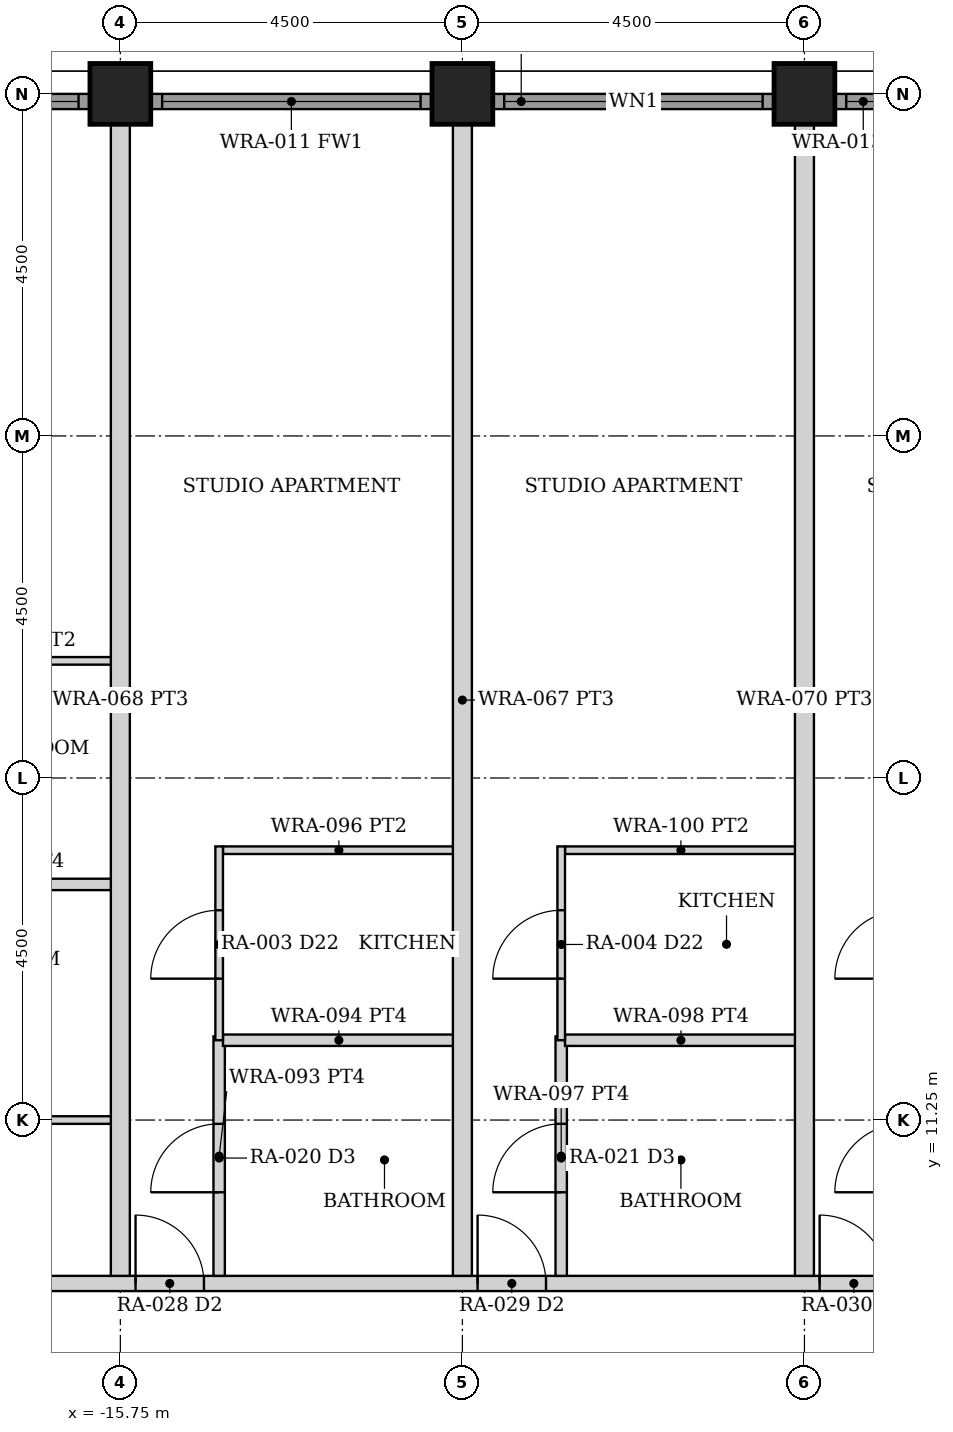
"""IFC4 building model, lengths in metres.
Left out: names, types, materials, properties, quantities, classifications, styles, units other than length and angle.
Written with IfcOpenShell. Run it as: python <this file> out.ifc"""

import sys

from ifc_helpers import new_model, si_unit, direction, frame, frame_2d, origin, origin_2d, place, context, subcontext, project, spatial, rectangle, hollow_rectangle, extrude, element, fill, save


model = new_model("IFC4")
c1 = context("Model", 3, precision=1e-05, world=origin(), true_north=direction((0.0, 1.0)))
c2 = subcontext(c1, "Body", "Model", "MODEL_VIEW")
j1 = project(units=[si_unit("LENGTHUNIT", "METRE"), si_unit("PLANEANGLEUNIT", "RADIAN")], contexts=[c1])
p1 = place(None, origin())
s1 = spatial("IfcSite", under=j1, at=p1, CompositionType="ELEMENT")
p2 = place(p1, origin())
s2 = spatial("IfcBuilding", under=s1, at=p2, CompositionType="ELEMENT")
p3 = place(p2, frame((0.0, 0.0, 30.0)))
s3 = spatial("IfcBuildingStorey", under=s2, at=p3, CompositionType="ELEMENT", Elevation=30.0)
for number, where, z_axis, x_axis in (
    (1, (-15.75, 24.75, 0.0), (0.0, 0.0, 1.0), (0.0, 1.0, 0.0)),
    (2, (-11.25, 24.75, 0.0), (0.0, 0.0, 1.0), (0.0, 1.0, 0.0)),
    (3, (-6.75, 24.75, 0.0), (0.0, 0.0, 1.0), (0.0, 1.0, 0.0)),
):
    element("IfcColumn", number, at=place(p3, frame(where, z_axis=z_axis, x_axis=x_axis)), inside=s3, PredefinedType="COLUMN", context=c2, shape_type="SweptSolid", body=[
        extrude(hollow_rectangle(XDim=0.8, YDim=0.8, WallThickness=0.08, at=origin_2d()), origin(), (0.0, 0.0, 1.0), 3.5),
    ])
p4 = place(p3, frame((-19.845, 24.65, 0.0), z_axis=(0.0, 0.0, 1.0), x_axis=(1.0, 0.0, 0.0)))
e4 = element("IfcWall", 4, at=p4, inside=s3, PredefinedType="SOLIDWALL", context=c2, shape_type="SweptSolid", body=[
    extrude(rectangle(XDim=3.69, YDim=0.2, at=frame_2d((1.845, 0.0))), origin(), (0.0, 0.0, 1.0), 2.379),
])
p5 = place(p4, frame((0.145, 0.0, 0.3)))
e5 = element("IfcOpeningElement", 5, at=p5, cuts=e4, PredefinedType="OPENING", context=c2, shape_type="SweptSolid", body=[
    extrude(rectangle(XDim=3.4, YDim=1.929, at=frame_2d((1.7, 0.964))), frame((0.0, 0.11, 0.0), z_axis=(0.0, -1.0, 0.0), x_axis=(1.0, 0.0, 0.0)), (0.0, 0.0, 1.0), 0.22),
])
p6 = place(p3, frame((-15.345, 24.65, 0.0), z_axis=(0.0, 0.0, 1.0), x_axis=(1.0, 0.0, 0.0)))
e6 = element("IfcWall", 6, at=p6, inside=s3, PredefinedType="SOLIDWALL", context=c2, shape_type="SweptSolid", body=[
    extrude(rectangle(XDim=3.69, YDim=0.2, at=frame_2d((1.845, 0.0))), origin(), (0.0, 0.0, 1.0), 2.379),
])
p7 = place(p6, frame((0.145, 0.0, 0.3)))
e7 = element("IfcOpeningElement", 7, at=p7, cuts=e6, PredefinedType="OPENING", context=c2, shape_type="SweptSolid", body=[
    extrude(rectangle(XDim=3.4, YDim=1.929, at=frame_2d((1.7, 0.964))), frame((0.0, 0.11, 0.0), z_axis=(0.0, -1.0, 0.0), x_axis=(1.0, 0.0, 0.0)), (0.0, 0.0, 1.0), 0.22),
])
p8 = place(p3, frame((-10.845, 24.65, 0.0), z_axis=(0.0, 0.0, 1.0), x_axis=(1.0, 0.0, 0.0)))
e8 = element("IfcWall", 8, at=p8, inside=s3, PredefinedType="SOLIDWALL", context=c2, shape_type="SweptSolid", body=[
    extrude(rectangle(XDim=3.69, YDim=0.2, at=frame_2d((1.845, 0.0))), origin(), (0.0, 0.0, 1.0), 2.379),
])
p9 = place(p8, frame((0.145, 0.0, 0.3)))
e9 = element("IfcOpeningElement", 9, at=p9, cuts=e8, PredefinedType="OPENING", context=c2, shape_type="SweptSolid", body=[
    extrude(rectangle(XDim=3.4, YDim=1.929, at=frame_2d((1.7, 0.964))), frame((0.0, 0.11, 0.0), z_axis=(0.0, -1.0, 0.0), x_axis=(1.0, 0.0, 0.0)), (0.0, 0.0, 1.0), 0.22),
])
p10 = place(p3, frame((-6.345, 24.65, 0.0), z_axis=(0.0, 0.0, 1.0), x_axis=(1.0, 0.0, 0.0)))
e10 = element("IfcWall", 10, at=p10, inside=s3, PredefinedType="SOLIDWALL", context=c2, shape_type="SweptSolid", body=[
    extrude(rectangle(XDim=3.69, YDim=0.2, at=frame_2d((1.845, 0.0))), origin(), (0.0, 0.0, 1.0), 2.379),
])
p11 = place(p10, frame((0.145, 0.0, 0.3)))
e11 = element("IfcOpeningElement", 11, at=p11, cuts=e10, PredefinedType="OPENING", context=c2, shape_type="SweptSolid", body=[
    extrude(rectangle(XDim=3.4, YDim=1.929, at=frame_2d((1.7, 0.964))), frame((0.0, 0.11, 0.0), z_axis=(0.0, -1.0, 0.0), x_axis=(1.0, 0.0, 0.0)), (0.0, 0.0, 1.0), 0.22),
])
p12 = place(p3, frame((-24.55, 9.1, 0.0), z_axis=(0.0, 0.0, 1.0), x_axis=(1.0, 0.0, 0.0)))
e12 = element("IfcWall", 12, at=p12, inside=s3, PredefinedType="PARTITIONING", context=c2, shape_type="SweptSolid", body=[
    extrude(rectangle(XDim=49.1, YDim=0.2, at=frame_2d((24.55, 0.0))), origin(), (0.0, 0.0, 1.0), 2.373),
])
p13 = place(p12, frame((5.1, 0.0, 0.0)))
e13 = element("IfcOpeningElement", 13, at=p13, cuts=e12, PredefinedType="OPENING", context=c2, shape_type="SweptSolid", body=[
    extrude(rectangle(XDim=0.9, YDim=2.1, at=frame_2d((0.45, 1.05))), frame((0.0, 0.11, 0.0), z_axis=(0.0, -1.0, 0.0), x_axis=(1.0, 0.0, 0.0)), (0.0, 0.0, 1.0), 0.22),
])
p14 = place(p12, frame((9.0, 0.0, 0.0)))
e14 = element("IfcOpeningElement", 14, at=p14, cuts=e12, PredefinedType="OPENING", context=c2, shape_type="SweptSolid", body=[
    extrude(rectangle(XDim=0.9, YDim=2.1, at=frame_2d((0.45, 1.05))), frame((0.0, 0.11, 0.0), z_axis=(0.0, -1.0, 0.0), x_axis=(1.0, 0.0, 0.0)), (0.0, 0.0, 1.0), 0.22),
])
p15 = place(p12, frame((13.5, 0.0, 0.0)))
e15 = element("IfcOpeningElement", 15, at=p15, cuts=e12, PredefinedType="OPENING", context=c2, shape_type="SweptSolid", body=[
    extrude(rectangle(XDim=0.9, YDim=2.1, at=frame_2d((0.45, 1.05))), frame((0.0, 0.11, 0.0), z_axis=(0.0, -1.0, 0.0), x_axis=(1.0, 0.0, 0.0)), (0.0, 0.0, 1.0), 0.22),
])
p16 = place(p12, frame((18.0, 0.0, 0.0)))
e16 = element("IfcOpeningElement", 16, at=p16, cuts=e12, PredefinedType="OPENING", context=c2, shape_type="SweptSolid", body=[
    extrude(rectangle(XDim=0.9, YDim=2.1, at=frame_2d((0.45, 1.05))), frame((0.0, 0.11, 0.0), z_axis=(0.0, -1.0, 0.0), x_axis=(1.0, 0.0, 0.0)), (0.0, 0.0, 1.0), 0.22),
])
p17 = place(p12, frame((22.5, 0.0, 0.0)))
e17 = element("IfcOpeningElement", 17, at=p17, cuts=e12, PredefinedType="OPENING", context=c2, shape_type="SweptSolid", body=[
    extrude(rectangle(XDim=0.9, YDim=2.1, at=frame_2d((0.45, 1.05))), frame((0.0, 0.11, 0.0), z_axis=(0.0, -1.0, 0.0), x_axis=(1.0, 0.0, 0.0)), (0.0, 0.0, 1.0), 0.22),
])
p18 = place(p12, frame((27.0, 0.0, 0.0)))
e18 = element("IfcOpeningElement", 18, at=p18, cuts=e12, PredefinedType="OPENING", context=c2, shape_type="SweptSolid", body=[
    extrude(rectangle(XDim=0.9, YDim=2.1, at=frame_2d((0.45, 1.05))), frame((0.0, 0.11, 0.0), z_axis=(0.0, -1.0, 0.0), x_axis=(1.0, 0.0, 0.0)), (0.0, 0.0, 1.0), 0.22),
])
p19 = place(p12, frame((31.5, 0.0, 0.0)))
e19 = element("IfcOpeningElement", 19, at=p19, cuts=e12, PredefinedType="OPENING", context=c2, shape_type="SweptSolid", body=[
    extrude(rectangle(XDim=0.9, YDim=2.1, at=frame_2d((0.45, 1.05))), frame((0.0, 0.11, 0.0), z_axis=(0.0, -1.0, 0.0), x_axis=(1.0, 0.0, 0.0)), (0.0, 0.0, 1.0), 0.22),
])
p20 = place(p12, frame((36.0, 0.0, 0.0)))
e20 = element("IfcOpeningElement", 20, at=p20, cuts=e12, PredefinedType="OPENING", context=c2, shape_type="SweptSolid", body=[
    extrude(rectangle(XDim=0.9, YDim=2.1, at=frame_2d((0.45, 1.05))), frame((0.0, 0.11, 0.0), z_axis=(0.0, -1.0, 0.0), x_axis=(1.0, 0.0, 0.0)), (0.0, 0.0, 1.0), 0.22),
])
p21 = place(p12, frame((43.1, 0.0, 0.0)))
e21 = element("IfcOpeningElement", 21, at=p21, cuts=e12, PredefinedType="OPENING", context=c2, shape_type="SweptSolid", body=[
    extrude(rectangle(XDim=0.9, YDim=2.1, at=frame_2d((0.45, 1.05))), frame((0.0, 0.11, 0.0), z_axis=(0.0, -1.0, 0.0), x_axis=(1.0, 0.0, 0.0)), (0.0, 0.0, 1.0), 0.22),
])
p22 = place(p3, frame((-24.35, 11.25, 0.0), z_axis=(0.0, 0.0, 1.0), x_axis=(1.0, 0.0, 0.0)))
e22 = element("IfcWall", 22, at=p22, inside=s3, PredefinedType="PARTITIONING", context=c2, shape_type="SweptSolid", body=[
    extrude(rectangle(XDim=8.5, YDim=0.1, at=frame_2d((4.25, 0.0))), origin(), (0.0, 0.0, 1.0), 2.373),
])
p23 = place(p22, frame((2.375, 0.0, 0.0)))
e23 = element("IfcOpeningElement", 23, at=p23, cuts=e22, PredefinedType="OPENING", context=c2, shape_type="SweptSolid", body=[
    extrude(rectangle(XDim=0.9, YDim=2.1, at=frame_2d((0.45, 1.05))), frame((0.0, 0.06, 0.0), z_axis=(0.0, -1.0, 0.0), x_axis=(1.0, 0.0, 0.0)), (0.0, 0.0, 1.0), 0.12),
])
p24 = place(p22, frame((0.35, 0.0, 0.0)))
e24 = element("IfcOpeningElement", 24, at=p24, cuts=e22, PredefinedType="OPENING", context=c2, shape_type="SweptSolid", body=[
    extrude(rectangle(XDim=0.9, YDim=2.1, at=frame_2d((0.45, 1.05))), frame((0.0, 0.06, 0.0), z_axis=(0.0, -1.0, 0.0), x_axis=(1.0, 0.0, 0.0)), (0.0, 0.0, 1.0), 0.12),
])
p25 = place(p22, frame((4.325, 0.0, 0.0)))
e25 = element("IfcOpeningElement", 25, at=p25, cuts=e22, PredefinedType="OPENING", context=c2, shape_type="SweptSolid", body=[
    extrude(rectangle(XDim=0.85, YDim=2.1, at=frame_2d((0.425, 1.05))), frame((0.0, 0.06, 0.0), z_axis=(0.0, -1.0, 0.0), x_axis=(1.0, 0.0, 0.0)), (0.0, 0.0, 1.0), 0.12),
])
p26 = place(p22, frame((6.52, 0.0, 0.0)))
e26 = element("IfcOpeningElement", 26, at=p26, cuts=e22, PredefinedType="OPENING", context=c2, shape_type="SweptSolid", body=[
    extrude(rectangle(XDim=0.9, YDim=2.1, at=frame_2d((0.45, 1.05))), frame((0.0, 0.06, 0.0), z_axis=(0.0, -1.0, 0.0), x_axis=(1.0, 0.0, 0.0)), (0.0, 0.0, 1.0), 0.12),
])
p27 = place(p3, frame((-18.95, 14.35, 0.0), z_axis=(0.0, 0.0, 1.0), x_axis=(1.0, 0.0, 0.0)))
e27 = element("IfcWall", 27, at=p27, inside=s3, PredefinedType="PARTITIONING", context=c2, shape_type="SweptSolid", body=[
    extrude(rectangle(XDim=3.14, YDim=0.15, at=frame_2d((1.57, 0.0))), origin(), (0.0, 0.0, 1.0), 2.373),
])
p28 = place(p3, frame((-18.95, 17.291, 0.0), z_axis=(0.0, 0.0, 1.0), x_axis=(1.0, 0.0, 0.0)))
e28 = element("IfcWall", 28, at=p28, inside=s3, PredefinedType="PARTITIONING", context=c2, shape_type="SweptSolid", body=[
    extrude(rectangle(XDim=3.14, YDim=0.1, at=frame_2d((1.57, 0.0))), origin(), (0.0, 0.0, 1.0), 2.373),
])
p29 = place(p3, frame((-14.45, 9.2, 0.0), z_axis=(0.0, 0.0, 1.0), x_axis=(0.0, 1.0, 0.0)))
e29 = element("IfcWall", 29, at=p29, inside=s3, PredefinedType="PARTITIONING", context=c2, shape_type="SweptSolid", body=[
    extrude(rectangle(XDim=3.15, YDim=0.15, at=frame_2d((1.575, 0.0))), origin(), (0.0, 0.0, 1.0), 2.373),
])
p30 = place(p29, frame((1.1, 0.0, 0.0)))
e30 = element("IfcOpeningElement", 30, at=p30, cuts=e29, PredefinedType="OPENING", context=c2, shape_type="SweptSolid", body=[
    extrude(rectangle(XDim=0.9, YDim=2.1, at=frame_2d((0.45, 1.05))), frame((0.0, 0.085, 0.0), z_axis=(0.0, -1.0, 0.0), x_axis=(1.0, 0.0, 0.0)), (0.0, 0.0, 1.0), 0.17),
])
p31 = place(p3, frame((-14.4, 12.3, 0.0), z_axis=(0.0, 0.0, 1.0), x_axis=(1.0, 0.0, 0.0)))
e31 = element("IfcWall", 31, at=p31, inside=s3, PredefinedType="PARTITIONING", context=c2, shape_type="SweptSolid", body=[
    extrude(rectangle(XDim=3.05, YDim=0.15, at=frame_2d((1.525, 0.0))), origin(), (0.0, 0.0, 1.0), 2.373),
])
p32 = place(p3, frame((-14.4, 14.8, 0.0), z_axis=(0.0, 0.0, 1.0), x_axis=(1.0, 0.0, 0.0)))
e32 = element("IfcWall", 32, at=p32, inside=s3, PredefinedType="PARTITIONING", context=c2, shape_type="SweptSolid", body=[
    extrude(rectangle(XDim=3.05, YDim=0.1, at=frame_2d((1.525, 0.0))), origin(), (0.0, 0.0, 1.0), 2.373),
])
p33 = place(p3, frame((-14.45, 12.3, 0.0), z_axis=(0.0, 0.0, 1.0), x_axis=(0.0, 1.0, 0.0)))
e33 = element("IfcWall", 33, at=p33, inside=s3, PredefinedType="PARTITIONING", context=c2, shape_type="SweptSolid", body=[
    extrude(rectangle(XDim=2.55, YDim=0.1, at=frame_2d((1.275, 0.0))), origin(), (0.0, 0.0, 1.0), 2.373),
])
p34 = place(p33, frame((0.81, 0.0, 0.0)))
e34 = element("IfcOpeningElement", 34, at=p34, cuts=e33, PredefinedType="OPENING", context=c2, shape_type="SweptSolid", body=[
    extrude(rectangle(XDim=0.9, YDim=2.1, at=frame_2d((0.45, 1.05))), frame((0.0, 0.06, 0.0), z_axis=(0.0, -1.0, 0.0), x_axis=(1.0, 0.0, 0.0)), (0.0, 0.0, 1.0), 0.12),
])
p35 = place(p3, frame((-9.95, 9.2, 0.0), z_axis=(0.0, 0.0, 1.0), x_axis=(0.0, 1.0, 0.0)))
e35 = element("IfcWall", 35, at=p35, inside=s3, PredefinedType="PARTITIONING", context=c2, shape_type="SweptSolid", body=[
    extrude(rectangle(XDim=3.15, YDim=0.15, at=frame_2d((1.575, 0.0))), origin(), (0.0, 0.0, 1.0), 2.373),
])
p36 = place(p35, frame((1.1, 0.0, 0.0)))
e36 = element("IfcOpeningElement", 36, at=p36, cuts=e35, PredefinedType="OPENING", context=c2, shape_type="SweptSolid", body=[
    extrude(rectangle(XDim=0.9, YDim=2.1, at=frame_2d((0.45, 1.05))), frame((0.0, 0.085, 0.0), z_axis=(0.0, -1.0, 0.0), x_axis=(1.0, 0.0, 0.0)), (0.0, 0.0, 1.0), 0.17),
])
p37 = place(p3, frame((-9.9, 12.3, 0.0), z_axis=(0.0, 0.0, 1.0), x_axis=(1.0, 0.0, 0.0)))
e37 = element("IfcWall", 37, at=p37, inside=s3, PredefinedType="PARTITIONING", context=c2, shape_type="SweptSolid", body=[
    extrude(rectangle(XDim=3.05, YDim=0.15, at=frame_2d((1.525, 0.0))), origin(), (0.0, 0.0, 1.0), 2.373),
])
p38 = place(p3, frame((-9.9, 14.8, 0.0), z_axis=(0.0, 0.0, 1.0), x_axis=(1.0, 0.0, 0.0)))
e38 = element("IfcWall", 38, at=p38, inside=s3, PredefinedType="PARTITIONING", context=c2, shape_type="SweptSolid", body=[
    extrude(rectangle(XDim=3.05, YDim=0.1, at=frame_2d((1.525, 0.0))), origin(), (0.0, 0.0, 1.0), 2.373),
])
p39 = place(p3, frame((-9.95, 12.3, 0.0), z_axis=(0.0, 0.0, 1.0), x_axis=(0.0, 1.0, 0.0)))
e39 = element("IfcWall", 39, at=p39, inside=s3, PredefinedType="PARTITIONING", context=c2, shape_type="SweptSolid", body=[
    extrude(rectangle(XDim=2.55, YDim=0.1, at=frame_2d((1.275, 0.0))), origin(), (0.0, 0.0, 1.0), 2.373),
])
p40 = place(p39, frame((0.81, 0.0, 0.0)))
e40 = element("IfcOpeningElement", 40, at=p40, cuts=e39, PredefinedType="OPENING", context=c2, shape_type="SweptSolid", body=[
    extrude(rectangle(XDim=0.9, YDim=2.1, at=frame_2d((0.45, 1.05))), frame((0.0, 0.06, 0.0), z_axis=(0.0, -1.0, 0.0), x_axis=(1.0, 0.0, 0.0)), (0.0, 0.0, 1.0), 0.12),
])
for number, where, z_axis, x_axis in (
    (41, (-15.75, 9.2, 0.0), (0.0, 0.0, 1.0), (0.0, 1.0, 0.0)),
    (42, (-11.25, 9.2, 0.0), (0.0, 0.0, 1.0), (0.0, 1.0, 0.0)),
    (43, (-6.75, 9.2, 0.0), (0.0, 0.0, 1.0), (0.0, 1.0, 0.0)),
):
    element("IfcWall", number, at=place(p3, frame(where, z_axis=z_axis, x_axis=x_axis)), inside=s3, PredefinedType="PARTITIONING", context=c2, shape_type="SweptSolid", body=[
        extrude(rectangle(XDim=15.15, YDim=0.25, at=frame_2d((7.575, 0.0))), origin(), (0.0, 0.0, 1.0), 2.373),
    ])
p41 = place(p5, origin())
e44 = element("IfcWindow", 44, at=p41, inside=s3, PartitioningType="SINGLE_PANEL", PredefinedType="WINDOW", context=c2, shape_type="SweptSolid", body=[
    extrude(rectangle(XDim=3.4, YDim=1.929, at=frame_2d((1.7, 0.964))), frame((0.0, 0.03, 0.0), z_axis=(0.0, -1.0, 0.0), x_axis=(1.0, 0.0, 0.0)), (0.0, 0.0, 1.0), 0.06),
])
fill(e5, e44)
p42 = place(p7, origin())
e45 = element("IfcWindow", 45, at=p42, inside=s3, PartitioningType="SINGLE_PANEL", PredefinedType="WINDOW", context=c2, shape_type="SweptSolid", body=[
    extrude(rectangle(XDim=3.4, YDim=1.929, at=frame_2d((1.7, 0.964))), frame((0.0, 0.03, 0.0), z_axis=(0.0, -1.0, 0.0), x_axis=(1.0, 0.0, 0.0)), (0.0, 0.0, 1.0), 0.06),
])
fill(e7, e45)
p43 = place(p9, origin())
e46 = element("IfcWindow", 46, at=p43, inside=s3, PartitioningType="SINGLE_PANEL", PredefinedType="WINDOW", context=c2, shape_type="SweptSolid", body=[
    extrude(rectangle(XDim=3.4, YDim=1.929, at=frame_2d((1.7, 0.964))), frame((0.0, 0.03, 0.0), z_axis=(0.0, -1.0, 0.0), x_axis=(1.0, 0.0, 0.0)), (0.0, 0.0, 1.0), 0.06),
])
fill(e9, e46)
p44 = place(p11, origin())
e47 = element("IfcWindow", 47, at=p44, inside=s3, PartitioningType="SINGLE_PANEL", PredefinedType="WINDOW", context=c2, shape_type="SweptSolid", body=[
    extrude(rectangle(XDim=3.4, YDim=1.929, at=frame_2d((1.7, 0.964))), frame((0.0, 0.03, 0.0), z_axis=(0.0, -1.0, 0.0), x_axis=(1.0, 0.0, 0.0)), (0.0, 0.0, 1.0), 0.06),
])
fill(e11, e47)
p45 = place(p14, origin())
e48 = element("IfcDoor", 48, at=p45, inside=s3, OperationType="SINGLE_SWING_LEFT", PredefinedType="DOOR", context=c2, shape_type="SweptSolid", body=[
    extrude(rectangle(XDim=0.9, YDim=2.1, at=frame_2d((0.45, 1.05))), frame((0.0, 0.025, 0.0), z_axis=(0.0, -1.0, 0.0), x_axis=(1.0, 0.0, 0.0)), (0.0, 0.0, 1.0), 0.05),
])
fill(e14, e48)
p46 = place(p30, origin())
e49 = element("IfcDoor", 49, at=p46, inside=s3, OperationType="SINGLE_SWING_LEFT", PredefinedType="DOOR", context=c2, shape_type="SweptSolid", body=[
    extrude(rectangle(XDim=0.9, YDim=2.1, at=frame_2d((0.45, 1.05))), frame((0.0, 0.025, 0.0), z_axis=(0.0, -1.0, 0.0), x_axis=(1.0, 0.0, 0.0)), (0.0, 0.0, 1.0), 0.05),
])
fill(e30, e49)
p47 = place(p34, origin())
e50 = element("IfcDoor", 50, at=p47, inside=s3, OperationType="SINGLE_SWING_LEFT", PredefinedType="DOOR", context=c2, shape_type="SweptSolid", body=[
    extrude(rectangle(XDim=0.9, YDim=2.1, at=frame_2d((0.45, 1.05))), frame((0.0, 0.025, 0.0), z_axis=(0.0, -1.0, 0.0), x_axis=(1.0, 0.0, 0.0)), (0.0, 0.0, 1.0), 0.05),
])
fill(e34, e50)
p48 = place(p15, origin())
e51 = element("IfcDoor", 51, at=p48, inside=s3, OperationType="SINGLE_SWING_LEFT", PredefinedType="DOOR", context=c2, shape_type="SweptSolid", body=[
    extrude(rectangle(XDim=0.9, YDim=2.1, at=frame_2d((0.45, 1.05))), frame((0.0, 0.025, 0.0), z_axis=(0.0, -1.0, 0.0), x_axis=(1.0, 0.0, 0.0)), (0.0, 0.0, 1.0), 0.05),
])
fill(e15, e51)
p49 = place(p36, origin())
e52 = element("IfcDoor", 52, at=p49, inside=s3, OperationType="SINGLE_SWING_LEFT", PredefinedType="DOOR", context=c2, shape_type="SweptSolid", body=[
    extrude(rectangle(XDim=0.9, YDim=2.1, at=frame_2d((0.45, 1.05))), frame((0.0, 0.025, 0.0), z_axis=(0.0, -1.0, 0.0), x_axis=(1.0, 0.0, 0.0)), (0.0, 0.0, 1.0), 0.05),
])
fill(e36, e52)
p50 = place(p40, origin())
e53 = element("IfcDoor", 53, at=p50, inside=s3, OperationType="SINGLE_SWING_LEFT", PredefinedType="DOOR", context=c2, shape_type="SweptSolid", body=[
    extrude(rectangle(XDim=0.9, YDim=2.1, at=frame_2d((0.45, 1.05))), frame((0.0, 0.025, 0.0), z_axis=(0.0, -1.0, 0.0), x_axis=(1.0, 0.0, 0.0)), (0.0, 0.0, 1.0), 0.05),
])
fill(e40, e53)
p51 = place(p16, origin())
e54 = element("IfcDoor", 54, at=p51, inside=s3, OperationType="SINGLE_SWING_LEFT", PredefinedType="DOOR", context=c2, shape_type="SweptSolid", body=[
    extrude(rectangle(XDim=0.9, YDim=2.1, at=frame_2d((0.45, 1.05))), frame((0.0, 0.025, 0.0), z_axis=(0.0, -1.0, 0.0), x_axis=(1.0, 0.0, 0.0)), (0.0, 0.0, 1.0), 0.05),
])
fill(e16, e54)
save(model, sys.argv[1])
